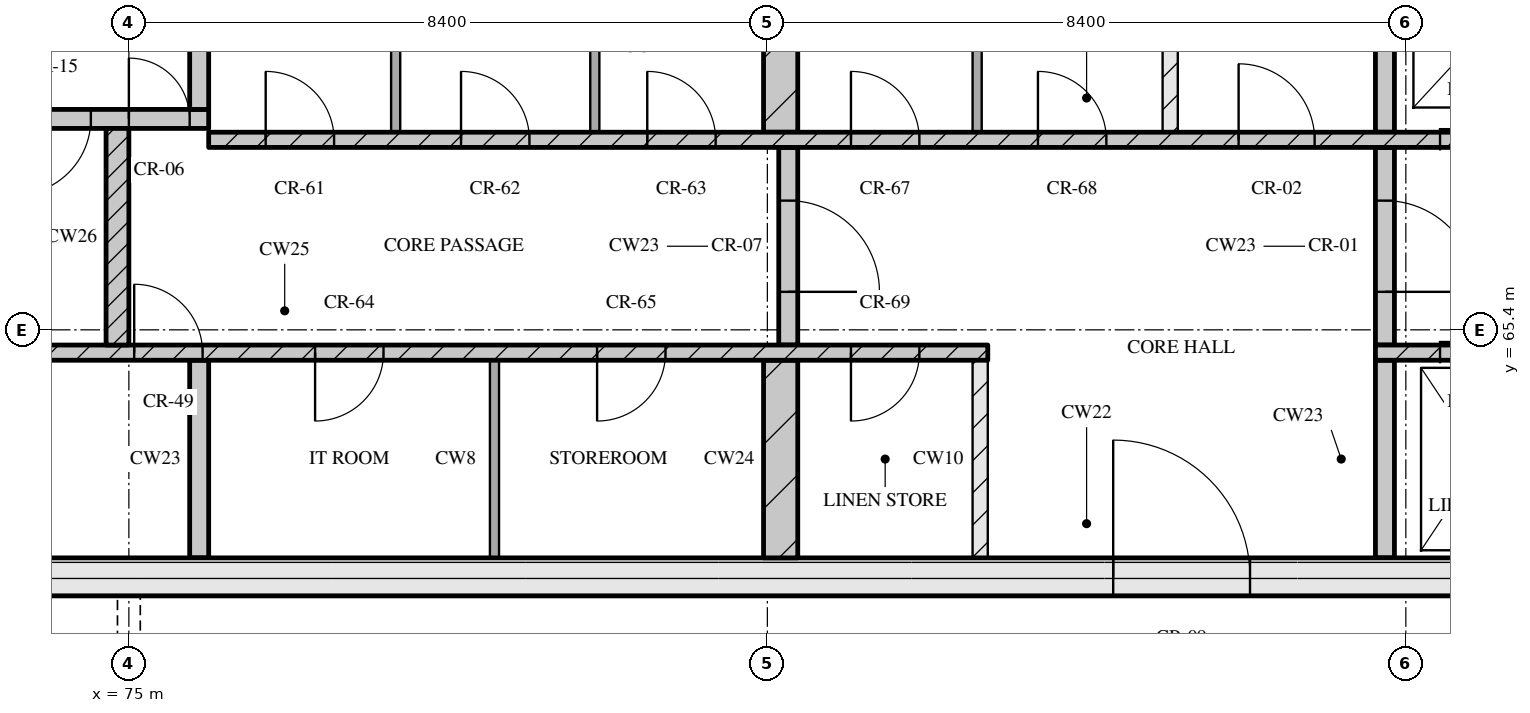
"""IFC4 building model, lengths in metres.
Left out: names, types, materials, properties, quantities, classifications, styles, units other than length and angle.
Written with IfcOpenShell. Run it as: python <this file> out.ifc"""

import sys

from ifc_helpers import new_model, si_unit, direction, frame, frame_2d, origin, place, context, subcontext, project, spatial, rectangle, extrude, element, fill, save


model = new_model("IFC4")
c1 = context("Model", 3, precision=1e-05, world=origin(), true_north=direction((0.0, 1.0)))
c2 = subcontext(c1, "Body", "Model", "MODEL_VIEW")
j1 = project(units=[si_unit("LENGTHUNIT", "METRE"), si_unit("PLANEANGLEUNIT", "RADIAN")], contexts=[c1])
p1 = place(None, origin())
s1 = spatial("IfcSite", under=j1, at=p1, CompositionType="ELEMENT")
p2 = place(p1, origin())
s2 = spatial("IfcBuilding", under=s1, at=p2, CompositionType="ELEMENT")
p3 = place(p2, frame((0.0, 0.0, 285.15)))
s3 = spatial("IfcBuildingStorey", under=s2, at=p3, CompositionType="ELEMENT", Elevation=285.15)
p4 = place(p3, frame((67.3, 62.15, 0.0), z_axis=(0.0, 0.0, 1.0), x_axis=(1.0, 0.0, 0.0)))
e1 = element("IfcWall", 1, at=p4, inside=s3, PredefinedType="SOLIDWALL", context=c2, shape_type="SweptSolid", body=[
    extrude(rectangle(XDim=40.6, YDim=0.5, at=frame_2d((20.3, 0.0))), origin(), (0.0, 0.0, 1.0), 3.32),
])
p5 = place(p4, frame((20.65, 0.0, 0.0)))
e2 = element("IfcOpeningElement", 2, at=p5, cuts=e1, PredefinedType="OPENING", context=c2, shape_type="SweptSolid", body=[
    extrude(rectangle(XDim=1.8, YDim=2.1, at=frame_2d((0.9, 1.05))), frame((0.0, 0.26, 0.0), z_axis=(0.0, -1.0, 0.0), x_axis=(1.0, 0.0, 0.0)), (0.0, 0.0, 1.0), 0.52),
])
p6 = place(p3, frame((75.925, 62.4, 0.0), z_axis=(0.0, 0.0, 1.0), x_axis=(0.0, 1.0, 0.0)))
e3 = element("IfcWall", 3, at=p6, inside=s3, PredefinedType="SOLIDWALL", context=c2, shape_type="SweptSolid", body=[
    extrude(rectangle(XDim=2.6, YDim=0.25, at=frame_2d((1.3, 0.0))), origin(), (0.0, 0.0, 1.0), 3.32),
])
p7 = place(p3, frame((79.81, 62.4, 0.0), z_axis=(0.0, 0.0, 1.0), x_axis=(0.0, 1.0, 0.0)))
e4 = element("IfcWall", 4, at=p7, inside=s3, PredefinedType="PARTITIONING", context=c2, shape_type="SweptSolid", body=[
    extrude(rectangle(XDim=2.6, YDim=0.12, at=frame_2d((1.3, 0.0))), origin(), (0.0, 0.0, 1.0), 3.32),
])
p8 = place(p3, frame((83.575, 62.4, 0.0), z_axis=(0.0, 0.0, 1.0), x_axis=(0.0, 1.0, 0.0)))
e5 = element("IfcWall", 5, at=p8, inside=s3, PredefinedType="SOLIDWALL", context=c2, shape_type="SweptSolid", body=[
    extrude(rectangle(XDim=2.6, YDim=0.45, at=frame_2d((1.3, 0.0))), origin(), (0.0, 0.0, 1.0), 3.32),
])
p9 = place(p3, frame((86.2, 62.4, 0.0), z_axis=(0.0, 0.0, 1.0), x_axis=(0.0, 1.0, 0.0)))
e6 = element("IfcWall", 6, at=p9, inside=s3, PredefinedType="PARTITIONING", context=c2, shape_type="SweptSolid", body=[
    extrude(rectangle(XDim=2.6, YDim=0.2, at=frame_2d((1.3, 0.0))), origin(), (0.0, 0.0, 1.0), 3.32),
])
p10 = place(p3, frame((91.525, 62.4, 0.0), z_axis=(0.0, 0.0, 1.0), x_axis=(0.0, 1.0, 0.0)))
e7 = element("IfcWall", 7, at=p10, inside=s3, PredefinedType="SOLIDWALL", context=c2, shape_type="SweptSolid", body=[
    extrude(rectangle(XDim=2.6, YDim=0.25, at=frame_2d((1.3, 0.0))), origin(), (0.0, 0.0, 1.0), 3.32),
])
p11 = place(p3, frame((67.8, 65.1, 0.0), z_axis=(0.0, 0.0, 1.0), x_axis=(1.0, 0.0, 0.0)))
e8 = element("IfcWall", 8, at=p11, inside=s3, PredefinedType="SOLIDWALL", context=c2, shape_type="SweptSolid", body=[
    extrude(rectangle(XDim=18.5, YDim=0.2, at=frame_2d((9.25, 0.0))), origin(), (0.0, 0.0, 1.0), 3.32),
])
p12 = place(p11, frame((7.27, 0.0, 0.0)))
e9 = element("IfcOpeningElement", 9, at=p12, cuts=e8, PredefinedType="OPENING", context=c2, shape_type="SweptSolid", body=[
    extrude(rectangle(XDim=0.9, YDim=2.1, at=frame_2d((0.45, 1.05))), frame((0.0, 0.11, 0.0), z_axis=(0.0, -1.0, 0.0), x_axis=(1.0, 0.0, 0.0)), (0.0, 0.0, 1.0), 0.22),
])
p13 = place(p11, frame((9.65, 0.0, 0.0)))
e10 = element("IfcOpeningElement", 10, at=p13, cuts=e8, PredefinedType="OPENING", context=c2, shape_type="SweptSolid", body=[
    extrude(rectangle(XDim=0.9, YDim=2.1, at=frame_2d((0.45, 1.05))), frame((0.0, 0.11, 0.0), z_axis=(0.0, -1.0, 0.0), x_axis=(1.0, 0.0, 0.0)), (0.0, 0.0, 1.0), 0.22),
])
p14 = place(p11, frame((13.36, 0.0, 0.0)))
e11 = element("IfcOpeningElement", 11, at=p14, cuts=e8, PredefinedType="OPENING", context=c2, shape_type="SweptSolid", body=[
    extrude(rectangle(XDim=0.9, YDim=2.1, at=frame_2d((0.45, 1.05))), frame((0.0, 0.11, 0.0), z_axis=(0.0, -1.0, 0.0), x_axis=(1.0, 0.0, 0.0)), (0.0, 0.0, 1.0), 0.22),
])
p15 = place(p11, frame((16.7, 0.0, 0.0)))
e12 = element("IfcOpeningElement", 12, at=p15, cuts=e8, PredefinedType="OPENING", context=c2, shape_type="SweptSolid", body=[
    extrude(rectangle(XDim=0.9, YDim=2.1, at=frame_2d((0.45, 1.05))), frame((0.0, 0.11, 0.0), z_axis=(0.0, -1.0, 0.0), x_axis=(1.0, 0.0, 0.0)), (0.0, 0.0, 1.0), 0.22),
])
p16 = place(p3, frame((91.4, 65.1, 0.0), z_axis=(0.0, 0.0, 1.0), x_axis=(1.0, 0.0, 0.0)))
e13 = element("IfcWall", 13, at=p16, inside=s3, PredefinedType="SOLIDWALL", context=c2, shape_type="SweptSolid", body=[
    extrude(rectangle(XDim=16.0, YDim=0.2, at=frame_2d((8.0, 0.0))), origin(), (0.0, 0.0, 1.0), 3.32),
])
p17 = place(p16, frame((0.85, 0.0, 0.0)))
e14 = element("IfcOpeningElement", 14, at=p17, cuts=e13, PredefinedType="OPENING", context=c2, shape_type="SweptSolid", body=[
    extrude(rectangle(XDim=1.1, YDim=2.1, at=frame_2d((0.55, 1.05))), frame((0.0, 0.11, 0.0), z_axis=(0.0, -1.0, 0.0), x_axis=(1.0, 0.0, 0.0)), (0.0, 0.0, 1.0), 0.22),
])
p18 = place(p16, frame((3.35, 0.0, 0.0)))
e15 = element("IfcOpeningElement", 15, at=p18, cuts=e13, PredefinedType="OPENING", context=c2, shape_type="SweptSolid", body=[
    extrude(rectangle(XDim=1.1, YDim=2.1, at=frame_2d((0.55, 1.05))), frame((0.0, 0.11, 0.0), z_axis=(0.0, -1.0, 0.0), x_axis=(1.0, 0.0, 0.0)), (0.0, 0.0, 1.0), 0.22),
])
p19 = place(p16, frame((5.85, 0.0, 0.0)))
e16 = element("IfcOpeningElement", 16, at=p19, cuts=e13, PredefinedType="OPENING", context=c2, shape_type="SweptSolid", body=[
    extrude(rectangle(XDim=1.1, YDim=2.1, at=frame_2d((0.55, 1.05))), frame((0.0, 0.11, 0.0), z_axis=(0.0, -1.0, 0.0), x_axis=(1.0, 0.0, 0.0)), (0.0, 0.0, 1.0), 0.22),
])
p20 = place(p16, frame((7.83, 0.0, 0.0)))
e17 = element("IfcOpeningElement", 17, at=p20, cuts=e13, PredefinedType="OPENING", context=c2, shape_type="SweptSolid", body=[
    extrude(rectangle(XDim=0.9, YDim=2.1, at=frame_2d((0.45, 1.05))), frame((0.0, 0.11, 0.0), z_axis=(0.0, -1.0, 0.0), x_axis=(1.0, 0.0, 0.0)), (0.0, 0.0, 1.0), 0.22),
])
p21 = place(p3, frame((74.85, 65.2, 0.0), z_axis=(0.0, 0.0, 1.0), x_axis=(0.0, 1.0, 0.0)))
e18 = element("IfcWall", 18, at=p21, inside=s3, PredefinedType="SOLIDWALL", context=c2, shape_type="SweptSolid", body=[
    extrude(rectangle(XDim=2.85, YDim=0.3, at=frame_2d((1.425, 0.0))), origin(), (0.0, 0.0, 1.0), 3.32),
])
p22 = place(p3, frame((83.675, 65.2, 0.0), z_axis=(0.0, 0.0, 1.0), x_axis=(0.0, 1.0, 0.0)))
e19 = element("IfcWall", 19, at=p22, inside=s3, PredefinedType="SOLIDWALL", context=c2, shape_type="SweptSolid", body=[
    extrude(rectangle(XDim=2.6, YDim=0.25, at=frame_2d((1.3, 0.0))), origin(), (0.0, 0.0, 1.0), 3.32),
])
p23 = place(p22, frame((0.7, 0.0, 0.0)))
e20 = element("IfcOpeningElement", 20, at=p23, cuts=e19, PredefinedType="OPENING", context=c2, shape_type="SweptSolid", body=[
    extrude(rectangle(XDim=1.2, YDim=2.1, at=frame_2d((0.6, 1.05))), frame((0.0, 0.135, 0.0), z_axis=(0.0, -1.0, 0.0), x_axis=(1.0, 0.0, 0.0)), (0.0, 0.0, 1.0), 0.27),
])
p24 = place(p3, frame((91.525, 65.2, 0.0), z_axis=(0.0, 0.0, 1.0), x_axis=(0.0, 1.0, 0.0)))
e21 = element("IfcWall", 21, at=p24, inside=s3, PredefinedType="SOLIDWALL", context=c2, shape_type="SweptSolid", body=[
    extrude(rectangle(XDim=2.6, YDim=0.25, at=frame_2d((1.3, 0.0))), origin(), (0.0, 0.0, 1.0), 3.32),
])
p25 = place(p24, frame((0.7, 0.0, 0.0)))
e22 = element("IfcOpeningElement", 22, at=p25, cuts=e21, PredefinedType="OPENING", context=c2, shape_type="SweptSolid", body=[
    extrude(rectangle(XDim=1.2, YDim=2.1, at=frame_2d((0.6, 1.05))), frame((0.0, 0.135, 0.0), z_axis=(0.0, -1.0, 0.0), x_axis=(1.0, 0.0, 0.0)), (0.0, 0.0, 1.0), 0.27),
])
p26 = place(p3, frame((76.05, 67.9, 0.0), z_axis=(0.0, 0.0, 1.0), x_axis=(1.0, 0.0, 0.0)))
e23 = element("IfcWall", 23, at=p26, inside=s3, PredefinedType="SOLIDWALL", context=c2, shape_type="SweptSolid", body=[
    extrude(rectangle(XDim=23.1, YDim=0.2, at=frame_2d((11.55, 0.0))), origin(), (0.0, 0.0, 1.0), 3.32),
])
p27 = place(p26, frame((0.75, 0.0, 0.0)))
e24 = element("IfcOpeningElement", 24, at=p27, cuts=e23, PredefinedType="OPENING", context=c2, shape_type="SweptSolid", body=[
    extrude(rectangle(XDim=0.9, YDim=2.1, at=frame_2d((0.45, 1.05))), frame((0.0, 0.11, 0.0), z_axis=(0.0, -1.0, 0.0), x_axis=(1.0, 0.0, 0.0)), (0.0, 0.0, 1.0), 0.22),
])
p28 = place(p26, frame((3.32, 0.0, 0.0)))
e25 = element("IfcOpeningElement", 25, at=p28, cuts=e23, PredefinedType="OPENING", context=c2, shape_type="SweptSolid", body=[
    extrude(rectangle(XDim=0.9, YDim=2.1, at=frame_2d((0.45, 1.05))), frame((0.0, 0.11, 0.0), z_axis=(0.0, -1.0, 0.0), x_axis=(1.0, 0.0, 0.0)), (0.0, 0.0, 1.0), 0.22),
])
p29 = place(p26, frame((5.77, 0.0, 0.0)))
e26 = element("IfcOpeningElement", 26, at=p29, cuts=e23, PredefinedType="OPENING", context=c2, shape_type="SweptSolid", body=[
    extrude(rectangle(XDim=0.9, YDim=2.1, at=frame_2d((0.45, 1.05))), frame((0.0, 0.11, 0.0), z_axis=(0.0, -1.0, 0.0), x_axis=(1.0, 0.0, 0.0)), (0.0, 0.0, 1.0), 0.22),
])
p30 = place(p26, frame((8.45, 0.0, 0.0)))
e27 = element("IfcOpeningElement", 27, at=p30, cuts=e23, PredefinedType="OPENING", context=c2, shape_type="SweptSolid", body=[
    extrude(rectangle(XDim=0.9, YDim=2.1, at=frame_2d((0.45, 1.05))), frame((0.0, 0.11, 0.0), z_axis=(0.0, -1.0, 0.0), x_axis=(1.0, 0.0, 0.0)), (0.0, 0.0, 1.0), 0.22),
])
p31 = place(p26, frame((10.91, 0.0, 0.0)))
e28 = element("IfcOpeningElement", 28, at=p31, cuts=e23, PredefinedType="OPENING", context=c2, shape_type="SweptSolid", body=[
    extrude(rectangle(XDim=0.9, YDim=2.1, at=frame_2d((0.45, 1.05))), frame((0.0, 0.11, 0.0), z_axis=(0.0, -1.0, 0.0), x_axis=(1.0, 0.0, 0.0)), (0.0, 0.0, 1.0), 0.22),
])
p32 = place(p26, frame((13.55, 0.0, 0.0)))
e29 = element("IfcOpeningElement", 29, at=p32, cuts=e23, PredefinedType="OPENING", context=c2, shape_type="SweptSolid", body=[
    extrude(rectangle(XDim=1.0, YDim=2.1, at=frame_2d((0.5, 1.05))), frame((0.0, 0.11, 0.0), z_axis=(0.0, -1.0, 0.0), x_axis=(1.0, 0.0, 0.0)), (0.0, 0.0, 1.0), 0.22),
])
p33 = place(p26, frame((16.2, 0.0, 0.0)))
e30 = element("IfcOpeningElement", 30, at=p33, cuts=e23, PredefinedType="OPENING", context=c2, shape_type="SweptSolid", body=[
    extrude(rectangle(XDim=1.1, YDim=2.1, at=frame_2d((0.55, 1.05))), frame((0.0, 0.11, 0.0), z_axis=(0.0, -1.0, 0.0), x_axis=(1.0, 0.0, 0.0)), (0.0, 0.0, 1.0), 0.22),
])
p34 = place(p26, frame((18.7, 0.0, 0.0)))
e31 = element("IfcOpeningElement", 31, at=p34, cuts=e23, PredefinedType="OPENING", context=c2, shape_type="SweptSolid", body=[
    extrude(rectangle(XDim=1.1, YDim=2.1, at=frame_2d((0.55, 1.05))), frame((0.0, 0.11, 0.0), z_axis=(0.0, -1.0, 0.0), x_axis=(1.0, 0.0, 0.0)), (0.0, 0.0, 1.0), 0.22),
])
p35 = place(p26, frame((21.2, 0.0, 0.0)))
e32 = element("IfcOpeningElement", 32, at=p35, cuts=e23, PredefinedType="OPENING", context=c2, shape_type="SweptSolid", body=[
    extrude(rectangle(XDim=1.1, YDim=2.1, at=frame_2d((0.55, 1.05))), frame((0.0, 0.11, 0.0), z_axis=(0.0, -1.0, 0.0), x_axis=(1.0, 0.0, 0.0)), (0.0, 0.0, 1.0), 0.22),
])
for number, where, z_axis, x_axis in (
    (33, (78.51, 68.0, 0.0), (0.0, 0.0, 1.0), (0.0, 1.0, 0.0)),
    (34, (81.13, 68.0, 0.0), (0.0, 0.0, 1.0), (0.0, 1.0, 0.0)),
):
    element("IfcWall", number, at=place(p3, frame(where, z_axis=z_axis, x_axis=x_axis)), inside=s3, PredefinedType="PARTITIONING", context=c2, shape_type="SweptSolid", body=[
        extrude(rectangle(XDim=2.6, YDim=0.12, at=frame_2d((1.3, 0.0))), origin(), (0.0, 0.0, 1.0), 3.32),
    ])
p36 = place(p3, frame((83.575, 68.0, 0.0), z_axis=(0.0, 0.0, 1.0), x_axis=(0.0, 1.0, 0.0)))
e35 = element("IfcWall", 35, at=p36, inside=s3, PredefinedType="SOLIDWALL", context=c2, shape_type="SweptSolid", body=[
    extrude(rectangle(XDim=2.6, YDim=0.45, at=frame_2d((1.3, 0.0))), origin(), (0.0, 0.0, 1.0), 3.32),
])
p37 = place(p3, frame((86.16, 68.0, 0.0), z_axis=(0.0, 0.0, 1.0), x_axis=(0.0, 1.0, 0.0)))
e36 = element("IfcWall", 36, at=p37, inside=s3, PredefinedType="PARTITIONING", context=c2, shape_type="SweptSolid", body=[
    extrude(rectangle(XDim=2.6, YDim=0.12, at=frame_2d((1.3, 0.0))), origin(), (0.0, 0.0, 1.0), 3.32),
])
p38 = place(p3, frame((88.7, 68.0, 0.0), z_axis=(0.0, 0.0, 1.0), x_axis=(0.0, 1.0, 0.0)))
e37 = element("IfcWall", 37, at=p38, inside=s3, PredefinedType="PARTITIONING", context=c2, shape_type="SweptSolid", body=[
    extrude(rectangle(XDim=2.6, YDim=0.2, at=frame_2d((1.3, 0.0))), origin(), (0.0, 0.0, 1.0), 3.32),
])
p39 = place(p3, frame((91.525, 68.0, 0.0), z_axis=(0.0, 0.0, 1.0), x_axis=(0.0, 1.0, 0.0)))
e38 = element("IfcWall", 38, at=p39, inside=s3, PredefinedType="SOLIDWALL", context=c2, shape_type="SweptSolid", body=[
    extrude(rectangle(XDim=2.6, YDim=0.25, at=frame_2d((1.3, 0.0))), origin(), (0.0, 0.0, 1.0), 3.32),
])
p40 = place(p3, frame((67.8, 68.175, 0.0), z_axis=(0.0, 0.0, 1.0), x_axis=(1.0, 0.0, 0.0)))
e39 = element("IfcWall", 39, at=p40, inside=s3, PredefinedType="SOLIDWALL", context=c2, shape_type="SweptSolid", body=[
    extrude(rectangle(XDim=8.25, YDim=0.25, at=frame_2d((4.125, 0.0))), origin(), (0.0, 0.0, 1.0), 3.32),
])
p41 = place(p40, frame((5.7, 0.0, 0.0)))
e40 = element("IfcOpeningElement", 40, at=p41, cuts=e39, PredefinedType="OPENING", context=c2, shape_type="SweptSolid", body=[
    extrude(rectangle(XDim=1.0, YDim=2.1, at=frame_2d((0.5, 1.05))), frame((0.0, 0.135, 0.0), z_axis=(0.0, -1.0, 0.0), x_axis=(1.0, 0.0, 0.0)), (0.0, 0.0, 1.0), 0.27),
])
p42 = place(p40, frame((7.2, 0.0, 0.0)))
e41 = element("IfcOpeningElement", 41, at=p42, cuts=e39, PredefinedType="OPENING", context=c2, shape_type="SweptSolid", body=[
    extrude(rectangle(XDim=0.8, YDim=2.1, at=frame_2d((0.4, 1.05))), frame((0.0, 0.135, 0.0), z_axis=(0.0, -1.0, 0.0), x_axis=(1.0, 0.0, 0.0)), (0.0, 0.0, 1.0), 0.27),
])
p43 = place(p3, frame((75.925, 68.3, 0.0), z_axis=(0.0, 0.0, 1.0), x_axis=(0.0, 1.0, 0.0)))
e42 = element("IfcWall", 42, at=p43, inside=s3, PredefinedType="SOLIDWALL", context=c2, shape_type="SweptSolid", body=[
    extrude(rectangle(XDim=2.3, YDim=0.25, at=frame_2d((1.15, 0.0))), origin(), (0.0, 0.0, 1.0), 3.32),
])
p44 = place(p5, origin())
e43 = element("IfcDoor", 43, at=p44, inside=s3, OperationType="DOUBLE_DOOR_SINGLE_SWING", PredefinedType="DOOR", context=c2, shape_type="SweptSolid", body=[
    extrude(rectangle(XDim=1.8, YDim=2.1, at=frame_2d((0.9, 1.05))), frame((0.0, 0.025, 0.0), z_axis=(0.0, -1.0, 0.0), x_axis=(1.0, 0.0, 0.0)), (0.0, 0.0, 1.0), 0.05),
])
fill(e2, e43)
p45 = place(p12, origin())
e44 = element("IfcDoor", 44, at=p45, inside=s3, OperationType="SINGLE_SWING_LEFT", PredefinedType="DOOR", context=c2, shape_type="SweptSolid", body=[
    extrude(rectangle(XDim=0.9, YDim=2.1, at=frame_2d((0.45, 1.05))), frame((0.0, 0.025, 0.0), z_axis=(0.0, -1.0, 0.0), x_axis=(1.0, 0.0, 0.0)), (0.0, 0.0, 1.0), 0.05),
])
fill(e9, e44)
p46 = place(p13, origin())
e45 = element("IfcDoor", 45, at=p46, inside=s3, OperationType="SINGLE_SWING_RIGHT", PredefinedType="DOOR", context=c2, shape_type="SweptSolid", body=[
    extrude(rectangle(XDim=0.9, YDim=2.1, at=frame_2d((0.45, 1.05))), frame((0.0, 0.025, 0.0), z_axis=(0.0, -1.0, 0.0), x_axis=(1.0, 0.0, 0.0)), (0.0, 0.0, 1.0), 0.05),
])
fill(e10, e45)
p47 = place(p14, origin())
e46 = element("IfcDoor", 46, at=p47, inside=s3, OperationType="SINGLE_SWING_RIGHT", PredefinedType="DOOR", context=c2, shape_type="SweptSolid", body=[
    extrude(rectangle(XDim=0.9, YDim=2.1, at=frame_2d((0.45, 1.05))), frame((0.0, 0.025, 0.0), z_axis=(0.0, -1.0, 0.0), x_axis=(1.0, 0.0, 0.0)), (0.0, 0.0, 1.0), 0.05),
])
fill(e11, e46)
p48 = place(p15, origin())
e47 = element("IfcDoor", 47, at=p48, inside=s3, OperationType="SINGLE_SWING_RIGHT", PredefinedType="DOOR", context=c2, shape_type="SweptSolid", body=[
    extrude(rectangle(XDim=0.9, YDim=2.1, at=frame_2d((0.45, 1.05))), frame((0.0, 0.025, 0.0), z_axis=(0.0, -1.0, 0.0), x_axis=(1.0, 0.0, 0.0)), (0.0, 0.0, 1.0), 0.05),
])
fill(e12, e47)
p49 = place(p17, origin())
e48 = element("IfcDoor", 48, at=p49, inside=s3, OperationType="SLIDING_TO_LEFT", PredefinedType="DOOR", context=c2, shape_type="SweptSolid", body=[
    extrude(rectangle(XDim=1.1, YDim=2.1, at=frame_2d((0.55, 1.05))), frame((0.0, 0.025, 0.0), z_axis=(0.0, -1.0, 0.0), x_axis=(1.0, 0.0, 0.0)), (0.0, 0.0, 1.0), 0.05),
])
fill(e14, e48)
p50 = place(p23, origin())
e49 = element("IfcDoor", 49, at=p50, inside=s3, OperationType="SINGLE_SWING_RIGHT", PredefinedType="DOOR", context=c2, shape_type="SweptSolid", body=[
    extrude(rectangle(XDim=1.2, YDim=2.1, at=frame_2d((0.6, 1.05))), frame((0.0, 0.025, 0.0), z_axis=(0.0, -1.0, 0.0), x_axis=(1.0, 0.0, 0.0)), (0.0, 0.0, 1.0), 0.05),
])
fill(e20, e49)
p51 = place(p25, origin())
e50 = element("IfcDoor", 50, at=p51, inside=s3, OperationType="SINGLE_SWING_RIGHT", PredefinedType="DOOR", context=c2, shape_type="SweptSolid", body=[
    extrude(rectangle(XDim=1.2, YDim=2.1, at=frame_2d((0.6, 1.05))), frame((0.0, 0.025, 0.0), z_axis=(0.0, -1.0, 0.0), x_axis=(1.0, 0.0, 0.0)), (0.0, 0.0, 1.0), 0.05),
])
fill(e22, e50)
p52 = place(p27, origin())
e51 = element("IfcDoor", 51, at=p52, inside=s3, OperationType="SINGLE_SWING_LEFT", PredefinedType="DOOR", context=c2, shape_type="SweptSolid", body=[
    extrude(rectangle(XDim=0.9, YDim=2.1, at=frame_2d((0.45, 1.05))), frame((0.0, 0.025, 0.0), z_axis=(0.0, -1.0, 0.0), x_axis=(1.0, 0.0, 0.0)), (0.0, 0.0, 1.0), 0.05),
])
fill(e24, e51)
p53 = place(p28, origin())
e52 = element("IfcDoor", 52, at=p53, inside=s3, OperationType="SINGLE_SWING_LEFT", PredefinedType="DOOR", context=c2, shape_type="SweptSolid", body=[
    extrude(rectangle(XDim=0.9, YDim=2.1, at=frame_2d((0.45, 1.05))), frame((0.0, 0.025, 0.0), z_axis=(0.0, -1.0, 0.0), x_axis=(1.0, 0.0, 0.0)), (0.0, 0.0, 1.0), 0.05),
])
fill(e25, e52)
p54 = place(p29, origin())
e53 = element("IfcDoor", 53, at=p54, inside=s3, OperationType="SINGLE_SWING_LEFT", PredefinedType="DOOR", context=c2, shape_type="SweptSolid", body=[
    extrude(rectangle(XDim=0.9, YDim=2.1, at=frame_2d((0.45, 1.05))), frame((0.0, 0.025, 0.0), z_axis=(0.0, -1.0, 0.0), x_axis=(1.0, 0.0, 0.0)), (0.0, 0.0, 1.0), 0.05),
])
fill(e26, e53)
p55 = place(p30, origin())
e54 = element("IfcDoor", 54, at=p55, inside=s3, OperationType="SINGLE_SWING_LEFT", PredefinedType="DOOR", context=c2, shape_type="SweptSolid", body=[
    extrude(rectangle(XDim=0.9, YDim=2.1, at=frame_2d((0.45, 1.05))), frame((0.0, 0.025, 0.0), z_axis=(0.0, -1.0, 0.0), x_axis=(1.0, 0.0, 0.0)), (0.0, 0.0, 1.0), 0.05),
])
fill(e27, e54)
p56 = place(p31, origin())
e55 = element("IfcDoor", 55, at=p56, inside=s3, OperationType="SINGLE_SWING_LEFT", PredefinedType="DOOR", context=c2, shape_type="SweptSolid", body=[
    extrude(rectangle(XDim=0.9, YDim=2.1, at=frame_2d((0.45, 1.05))), frame((0.0, 0.025, 0.0), z_axis=(0.0, -1.0, 0.0), x_axis=(1.0, 0.0, 0.0)), (0.0, 0.0, 1.0), 0.05),
])
fill(e28, e55)
p57 = place(p32, origin())
e56 = element("IfcDoor", 56, at=p57, inside=s3, OperationType="SINGLE_SWING_LEFT", PredefinedType="DOOR", context=c2, shape_type="SweptSolid", body=[
    extrude(rectangle(XDim=1.0, YDim=2.1, at=frame_2d((0.5, 1.05))), frame((0.0, 0.025, 0.0), z_axis=(0.0, -1.0, 0.0), x_axis=(1.0, 0.0, 0.0)), (0.0, 0.0, 1.0), 0.05),
])
fill(e29, e56)
p58 = place(p33, origin())
e57 = element("IfcDoor", 57, at=p58, inside=s3, OperationType="SLIDING_TO_RIGHT", PredefinedType="DOOR", context=c2, shape_type="SweptSolid", body=[
    extrude(rectangle(XDim=1.1, YDim=2.1, at=frame_2d((0.55, 1.05))), frame((0.0, 0.025, 0.0), z_axis=(0.0, -1.0, 0.0), x_axis=(1.0, 0.0, 0.0)), (0.0, 0.0, 1.0), 0.05),
])
fill(e30, e57)
p59 = place(p41, origin())
e58 = element("IfcDoor", 58, at=p59, inside=s3, OperationType="SINGLE_SWING_RIGHT", PredefinedType="DOOR", context=c2, shape_type="SweptSolid", body=[
    extrude(rectangle(XDim=1.0, YDim=2.1, at=frame_2d((0.5, 1.05))), frame((0.0, 0.025, 0.0), z_axis=(0.0, -1.0, 0.0), x_axis=(1.0, 0.0, 0.0)), (0.0, 0.0, 1.0), 0.05),
])
fill(e40, e58)
p60 = place(p42, origin())
e59 = element("IfcDoor", 59, at=p60, inside=s3, OperationType="SINGLE_SWING_LEFT", PredefinedType="DOOR", context=c2, shape_type="SweptSolid", body=[
    extrude(rectangle(XDim=0.8, YDim=2.1, at=frame_2d((0.4, 1.05))), frame((0.0, 0.025, 0.0), z_axis=(0.0, -1.0, 0.0), x_axis=(1.0, 0.0, 0.0)), (0.0, 0.0, 1.0), 0.05),
])
fill(e41, e59)
save(model, sys.argv[1])
